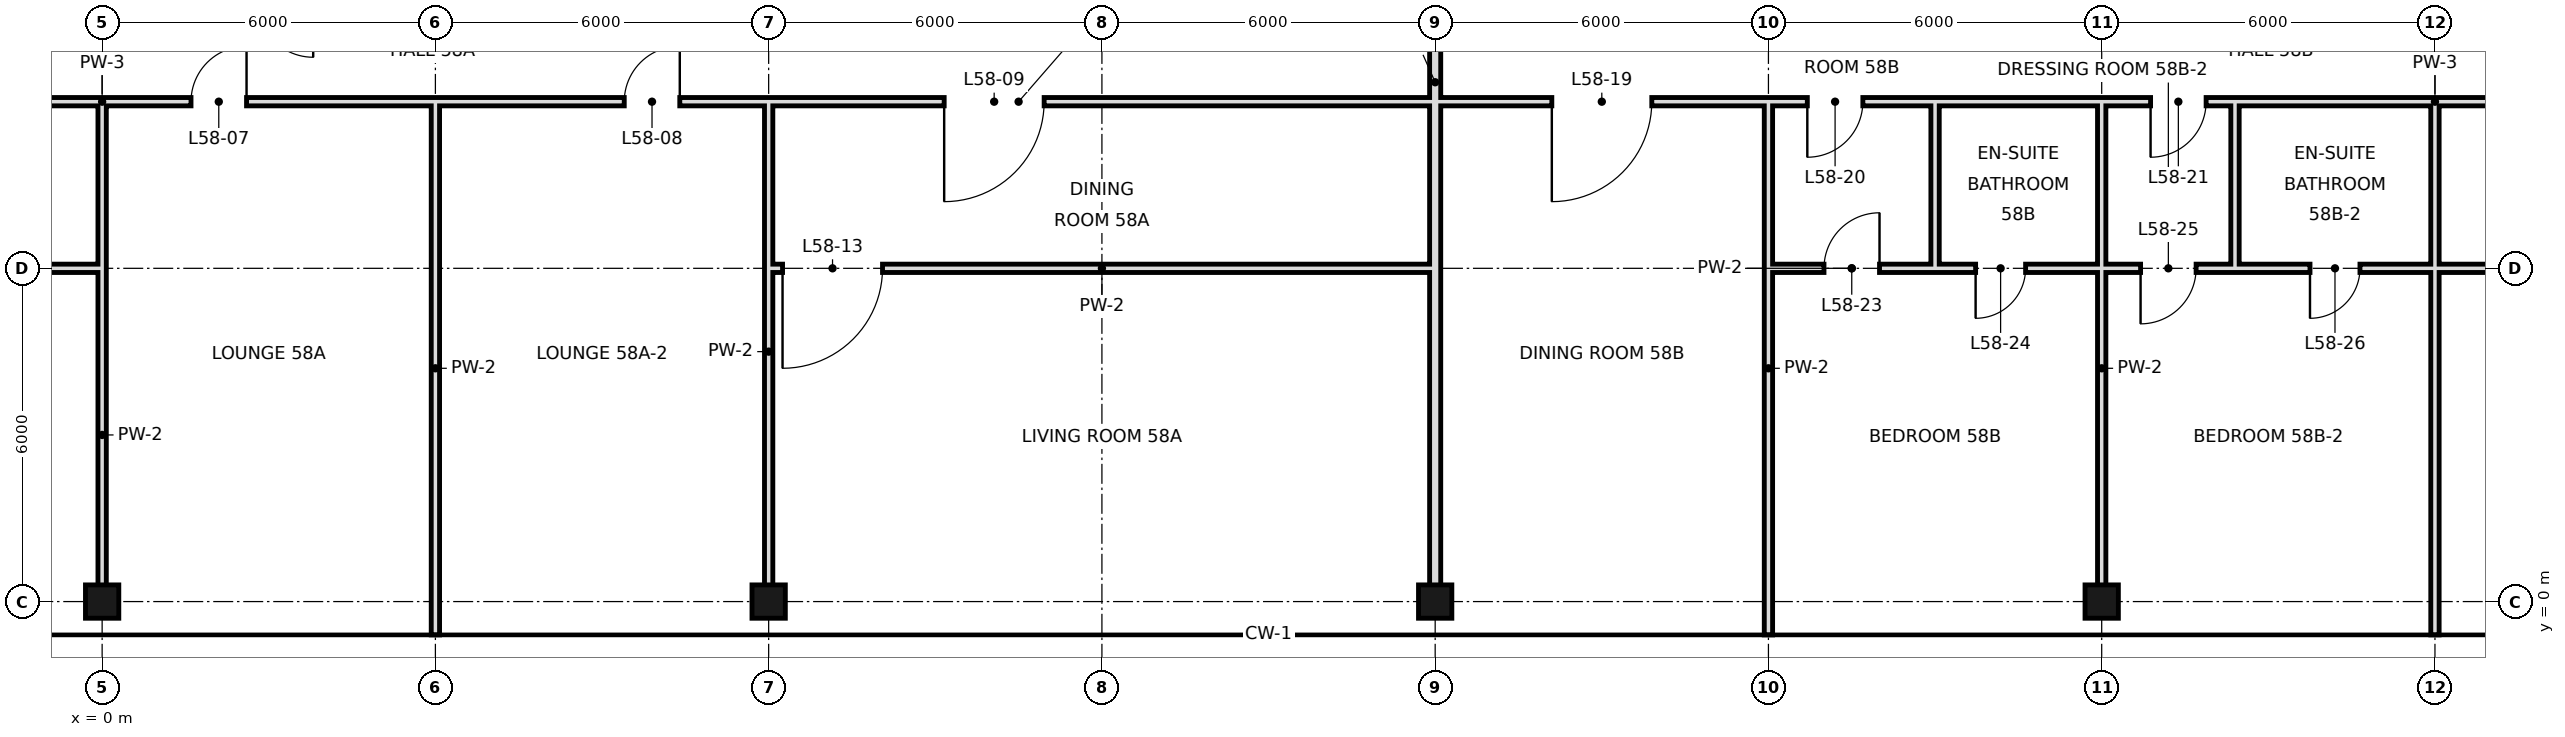
"""IFC4 building model, lengths in metres.
Left out: names, types, materials, properties, quantities, classifications, styles, units other than length and angle.
Written with IfcOpenShell. Run it as: python <this file> out.ifc"""

import sys

from ifc_helpers import new_model, si_unit, direction, frame, frame_2d, origin, origin_2d, place, context, subcontext, project, spatial, rectangle, hollow_rectangle, extrude, element, fill, save


model = new_model("IFC4")
c1 = context("Model", 3, precision=1e-05, world=origin(), true_north=direction((0.0, 1.0)))
c2 = subcontext(c1, "Body", "Model", "MODEL_VIEW")
j1 = project(units=[si_unit("LENGTHUNIT", "METRE"), si_unit("PLANEANGLEUNIT", "RADIAN")], contexts=[c1])
p1 = place(None, origin())
s1 = spatial("IfcSite", under=j1, at=p1, CompositionType="ELEMENT")
p2 = place(p1, origin())
s2 = spatial("IfcBuilding", under=s1, at=p2, CompositionType="ELEMENT")
p3 = place(p2, frame((0.0, 0.0, 246.8)))
s3 = spatial("IfcBuildingStorey", under=s2, at=p3, CompositionType="ELEMENT", Elevation=246.8)
for number, where, z_axis, x_axis in (
    (1, (0.0, 0.0, 0.0), (0.0, 0.0, 1.0), (1.0, 0.0, 0.0)),
    (2, (12.0, 0.0, 0.0), (0.0, 0.0, 1.0), (1.0, 0.0, 0.0)),
    (3, (24.0, 0.0, 0.0), (0.0, 0.0, 1.0), (1.0, 0.0, 0.0)),
    (4, (36.0, 0.0, 0.0), (0.0, 0.0, 1.0), (1.0, 0.0, 0.0)),
):
    element("IfcColumn", number, at=place(p3, frame(where, z_axis=z_axis, x_axis=x_axis)), inside=s3, PredefinedType="COLUMN", context=c2, shape_type="SweptSolid", body=[
        extrude(hollow_rectangle(XDim=0.6, YDim=0.6, WallThickness=0.028, at=origin_2d()), origin(), (0.0, 0.0, 1.0), 3.6),
    ])
p4 = place(p3, frame((0.0, 0.0, 0.0), z_axis=(0.0, 0.0, 1.0), x_axis=(0.0, 1.0, 0.0)))
e5 = element("IfcWall", 5, at=p4, inside=s3, PredefinedType="PARTITIONING", context=c2, shape_type="SweptSolid", body=[
    extrude(rectangle(XDim=6.0, YDim=0.15, at=frame_2d((3.0, 0.0))), origin(), (0.0, 0.0, 1.0), 2.72),
])
p5 = place(p3, frame((0.0, 6.0, 0.0), z_axis=(0.0, 0.0, 1.0), x_axis=(0.0, 1.0, 0.0)))
e6 = element("IfcWall", 6, at=p5, inside=s3, PredefinedType="PARTITIONING", context=c2, shape_type="SweptSolid", body=[
    extrude(rectangle(XDim=3.0, YDim=0.15, at=frame_2d((1.5, 0.0))), origin(), (0.0, 0.0, 1.0), 2.72),
])
p6 = place(p3, frame((12.0, 0.0, 0.0), z_axis=(0.0, 0.0, 1.0), x_axis=(0.0, 1.0, 0.0)))
e7 = element("IfcWall", 7, at=p6, inside=s3, PredefinedType="PARTITIONING", context=c2, shape_type="SweptSolid", body=[
    extrude(rectangle(XDim=9.0, YDim=0.15, at=frame_2d((4.5, 0.0))), origin(), (0.0, 0.0, 1.0), 2.72),
])
p7 = place(p3, frame((24.0, 0.0, 0.0), z_axis=(0.0, 0.0, 1.0), x_axis=(0.0, 1.0, 0.0)))
e8 = element("IfcWall", 8, at=p7, inside=s3, PredefinedType="SOLIDWALL", context=c2, shape_type="SweptSolid", body=[
    extrude(rectangle(XDim=18.7, YDim=0.2, at=frame_2d((9.35, 0.0))), origin(), (0.0, 0.0, 1.0), 2.72),
])
p8 = place(p3, frame((30.0, -0.6, 0.0), z_axis=(0.0, 0.0, 1.0), x_axis=(0.0, 1.0, 0.0)))
e9 = element("IfcWall", 9, at=p8, inside=s3, PredefinedType="PARTITIONING", context=c2, shape_type="SweptSolid", body=[
    extrude(rectangle(XDim=9.6, YDim=0.15, at=frame_2d((4.8, 0.0))), origin(), (0.0, 0.0, 1.0), 2.72),
])
p9 = place(p3, frame((33.0, 6.0, 0.0), z_axis=(0.0, 0.0, 1.0), x_axis=(0.0, 1.0, 0.0)))
e10 = element("IfcWall", 10, at=p9, inside=s3, PredefinedType="PARTITIONING", context=c2, shape_type="SweptSolid", body=[
    extrude(rectangle(XDim=3.0, YDim=0.15, at=frame_2d((1.5, 0.0))), origin(), (0.0, 0.0, 1.0), 3.42),
])
p10 = place(p3, frame((36.0, 0.0, 0.0), z_axis=(0.0, 0.0, 1.0), x_axis=(0.0, 1.0, 0.0)))
e11 = element("IfcWall", 11, at=p10, inside=s3, PredefinedType="PARTITIONING", context=c2, shape_type="SweptSolid", body=[
    extrude(rectangle(XDim=6.0, YDim=0.15, at=frame_2d((3.0, 0.0))), origin(), (0.0, 0.0, 1.0), 2.72),
])
p11 = place(p3, frame((36.0, 6.0, 0.0), z_axis=(0.0, 0.0, 1.0), x_axis=(0.0, 1.0, 0.0)))
e12 = element("IfcWall", 12, at=p11, inside=s3, PredefinedType="PARTITIONING", context=c2, shape_type="SweptSolid", body=[
    extrude(rectangle(XDim=3.0, YDim=0.15, at=frame_2d((1.5, 0.0))), origin(), (0.0, 0.0, 1.0), 2.72),
])
p12 = place(p3, frame((38.4, 6.0, 0.0), z_axis=(0.0, 0.0, 1.0), x_axis=(0.0, 1.0, 0.0)))
e13 = element("IfcWall", 13, at=p12, inside=s3, PredefinedType="PARTITIONING", context=c2, shape_type="SweptSolid", body=[
    extrude(rectangle(XDim=3.0, YDim=0.15, at=frame_2d((1.5, 0.0))), origin(), (0.0, 0.0, 1.0), 3.42),
])
p13 = place(p3, frame((42.0, -0.6, 0.0), z_axis=(0.0, 0.0, 1.0), x_axis=(0.0, 1.0, 0.0)))
e14 = element("IfcWall", 14, at=p13, inside=s3, PredefinedType="PARTITIONING", context=c2, shape_type="SweptSolid", body=[
    extrude(rectangle(XDim=6.6, YDim=0.15, at=frame_2d((3.3, 0.0))), origin(), (0.0, 0.0, 1.0), 2.72),
])
p14 = place(p3, frame((42.0, 6.0, 0.0), z_axis=(0.0, 0.0, 1.0), x_axis=(0.0, 1.0, 0.0)))
e15 = element("IfcWall", 15, at=p14, inside=s3, PredefinedType="PARTITIONING", context=c2, shape_type="SweptSolid", body=[
    extrude(rectangle(XDim=3.0, YDim=0.15, at=frame_2d((1.5, 0.0))), origin(), (0.0, 0.0, 1.0), 2.72),
])
p15 = place(p3, frame((6.0, -0.6, 0.0), z_axis=(0.0, 0.0, 1.0), x_axis=(0.0, 1.0, 0.0)))
e16 = element("IfcWall", 16, at=p15, inside=s3, PredefinedType="PARTITIONING", context=c2, shape_type="SweptSolid", body=[
    extrude(rectangle(XDim=9.6, YDim=0.15, at=frame_2d((4.8, 0.0))), origin(), (0.0, 0.0, 1.0), 2.72),
])
p16 = place(p3, frame((12.0, 6.0, 0.0), z_axis=(0.0, 0.0, 1.0), x_axis=(1.0, 0.0, 0.0)))
e17 = element("IfcWall", 17, at=p16, inside=s3, PredefinedType="PARTITIONING", context=c2, shape_type="SweptSolid", body=[
    extrude(rectangle(XDim=12.0, YDim=0.15, at=frame_2d((6.0, 0.0))), origin(), (0.0, 0.0, 1.0), 2.97),
])
p17 = place(p16, frame((0.25, 0.0, 0.0)))
e18 = element("IfcOpeningElement", 18, at=p17, cuts=e17, PredefinedType="OPENING", context=c2, shape_type="SweptSolid", body=[
    extrude(rectangle(XDim=1.8, YDim=2.4, at=frame_2d((0.9, 1.2))), frame((0.0, 0.085, 0.0), z_axis=(0.0, -1.0, 0.0), x_axis=(1.0, 0.0, 0.0)), (0.0, 0.0, 1.0), 0.17),
])
p18 = place(p3, frame((30.0, 6.0, 0.0), z_axis=(0.0, 0.0, 1.0), x_axis=(1.0, 0.0, 0.0)))
e19 = element("IfcWall", 19, at=p18, inside=s3, PredefinedType="PARTITIONING", context=c2, shape_type="SweptSolid", body=[
    extrude(rectangle(XDim=3.0, YDim=0.15, at=frame_2d((1.5, 0.0))), origin(), (0.0, 0.0, 1.0), 2.97),
])
p19 = place(p18, frame((1.0, 0.0, 0.0)))
e20 = element("IfcOpeningElement", 20, at=p19, cuts=e19, PredefinedType="OPENING", context=c2, shape_type="SweptSolid", body=[
    extrude(rectangle(XDim=1.0, YDim=2.4, at=frame_2d((0.5, 1.2))), frame((0.0, 0.085, 0.0), z_axis=(0.0, -1.0, 0.0), x_axis=(1.0, 0.0, 0.0)), (0.0, 0.0, 1.0), 0.17),
])
p20 = place(p3, frame((36.0, 6.0, 0.0), z_axis=(0.0, 0.0, 1.0), x_axis=(1.0, 0.0, 0.0)))
e21 = element("IfcWall", 21, at=p20, inside=s3, PredefinedType="PARTITIONING", context=c2, shape_type="SweptSolid", body=[
    extrude(rectangle(XDim=2.4, YDim=0.15, at=frame_2d((1.2, 0.0))), origin(), (0.0, 0.0, 1.0), 2.97),
])
p21 = place(p20, frame((0.7, 0.0, 0.0)))
e22 = element("IfcOpeningElement", 22, at=p21, cuts=e21, PredefinedType="OPENING", context=c2, shape_type="SweptSolid", body=[
    extrude(rectangle(XDim=1.0, YDim=2.4, at=frame_2d((0.5, 1.2))), frame((0.0, 0.085, 0.0), z_axis=(0.0, -1.0, 0.0), x_axis=(1.0, 0.0, 0.0)), (0.0, 0.0, 1.0), 0.17),
])
p22 = place(p3, frame((42.0, 6.0, 0.0), z_axis=(0.0, 0.0, 1.0), x_axis=(1.0, 0.0, 0.0)))
e23 = element("IfcWall", 23, at=p22, inside=s3, PredefinedType="PARTITIONING", context=c2, shape_type="SweptSolid", body=[
    extrude(rectangle(XDim=12.0, YDim=0.15, at=frame_2d((6.0, 0.0))), origin(), (0.0, 0.0, 1.0), 2.97),
])
p23 = place(p22, frame((7.04, 0.0, 0.0)))
e24 = element("IfcOpeningElement", 24, at=p23, cuts=e23, PredefinedType="OPENING", context=c2, shape_type="SweptSolid", body=[
    extrude(rectangle(XDim=1.8, YDim=2.4, at=frame_2d((0.9, 1.2))), frame((0.0, 0.085, 0.0), z_axis=(0.0, -1.0, 0.0), x_axis=(1.0, 0.0, 0.0)), (0.0, 0.0, 1.0), 0.17),
])
p24 = place(p3, frame((-8.4, 6.0, 0.0), z_axis=(0.0, 0.0, 1.0), x_axis=(1.0, 0.0, 0.0)))
e25 = element("IfcWall", 25, at=p24, inside=s3, PredefinedType="PARTITIONING", context=c2, shape_type="SweptSolid", body=[
    extrude(rectangle(XDim=8.4, YDim=0.15, at=frame_2d((4.2, 0.0))), origin(), (0.0, 0.0, 1.0), 2.72),
])
p25 = place(p24, frame((1.25, 0.0, 0.0)))
e26 = element("IfcOpeningElement", 26, at=p25, cuts=e25, PredefinedType="OPENING", context=c2, shape_type="SweptSolid", body=[
    extrude(rectangle(XDim=0.9, YDim=2.4, at=frame_2d((0.45, 1.2))), frame((0.0, 0.085, 0.0), z_axis=(0.0, -1.0, 0.0), x_axis=(1.0, 0.0, 0.0)), (0.0, 0.0, 1.0), 0.17),
])
p26 = place(p3, frame((33.0, 6.0, 0.0), z_axis=(0.0, 0.0, 1.0), x_axis=(1.0, 0.0, 0.0)))
e27 = element("IfcWall", 27, at=p26, inside=s3, PredefinedType="PARTITIONING", context=c2, shape_type="SweptSolid", body=[
    extrude(rectangle(XDim=3.0, YDim=0.15, at=frame_2d((1.5, 0.0))), origin(), (0.0, 0.0, 1.0), 2.97),
])
p27 = place(p26, frame((0.73, 0.0, 0.0)))
e28 = element("IfcOpeningElement", 28, at=p27, cuts=e27, PredefinedType="OPENING", context=c2, shape_type="SweptSolid", body=[
    extrude(rectangle(XDim=0.9, YDim=2.4, at=frame_2d((0.45, 1.2))), frame((0.0, 0.085, 0.0), z_axis=(0.0, -1.0, 0.0), x_axis=(1.0, 0.0, 0.0)), (0.0, 0.0, 1.0), 0.17),
])
p28 = place(p3, frame((38.4, 6.0, 0.0), z_axis=(0.0, 0.0, 1.0), x_axis=(1.0, 0.0, 0.0)))
e29 = element("IfcWall", 29, at=p28, inside=s3, PredefinedType="PARTITIONING", context=c2, shape_type="SweptSolid", body=[
    extrude(rectangle(XDim=3.6, YDim=0.15, at=frame_2d((1.8, 0.0))), origin(), (0.0, 0.0, 1.0), 2.97),
])
p29 = place(p28, frame((1.35, 0.0, 0.0)))
e30 = element("IfcOpeningElement", 30, at=p29, cuts=e29, PredefinedType="OPENING", context=c2, shape_type="SweptSolid", body=[
    extrude(rectangle(XDim=0.9, YDim=2.4, at=frame_2d((0.45, 1.2))), frame((0.0, 0.085, 0.0), z_axis=(0.0, -1.0, 0.0), x_axis=(1.0, 0.0, 0.0)), (0.0, 0.0, 1.0), 0.17),
])
p30 = place(p3, frame((0.0, 9.0, 0.0), z_axis=(0.0, 0.0, 1.0), x_axis=(1.0, 0.0, 0.0)))
e31 = element("IfcWall", 31, at=p30, inside=s3, PredefinedType="PARTITIONING", context=c2, shape_type="SweptSolid", body=[
    extrude(rectangle(XDim=33.0, YDim=0.15, at=frame_2d((16.5, 0.0))), origin(), (0.0, 0.0, 1.0), 3.42),
])
p31 = place(p30, frame((1.6, 0.0, 0.0)))
e32 = element("IfcOpeningElement", 32, at=p31, cuts=e31, PredefinedType="OPENING", context=c2, shape_type="SweptSolid", body=[
    extrude(rectangle(XDim=1.0, YDim=2.4, at=frame_2d((0.5, 1.2))), frame((0.0, 0.085, 0.0), z_axis=(0.0, -1.0, 0.0), x_axis=(1.0, 0.0, 0.0)), (0.0, 0.0, 1.0), 0.17),
])
p32 = place(p30, frame((9.4, 0.0, 0.0)))
e33 = element("IfcOpeningElement", 33, at=p32, cuts=e31, PredefinedType="OPENING", context=c2, shape_type="SweptSolid", body=[
    extrude(rectangle(XDim=1.0, YDim=2.4, at=frame_2d((0.5, 1.2))), frame((0.0, 0.085, 0.0), z_axis=(0.0, -1.0, 0.0), x_axis=(1.0, 0.0, 0.0)), (0.0, 0.0, 1.0), 0.17),
])
p33 = place(p30, frame((15.16, 0.0, 0.0)))
e34 = element("IfcOpeningElement", 34, at=p33, cuts=e31, PredefinedType="OPENING", context=c2, shape_type="SweptSolid", body=[
    extrude(rectangle(XDim=1.8, YDim=2.4, at=frame_2d((0.9, 1.2))), frame((0.0, 0.085, 0.0), z_axis=(0.0, -1.0, 0.0), x_axis=(1.0, 0.0, 0.0)), (0.0, 0.0, 1.0), 0.17),
])
p34 = place(p30, frame((26.1, 0.0, 0.0)))
e35 = element("IfcOpeningElement", 35, at=p34, cuts=e31, PredefinedType="OPENING", context=c2, shape_type="SweptSolid", body=[
    extrude(rectangle(XDim=1.8, YDim=2.4, at=frame_2d((0.9, 1.2))), frame((0.0, 0.085, 0.0), z_axis=(0.0, -1.0, 0.0), x_axis=(1.0, 0.0, 0.0)), (0.0, 0.0, 1.0), 0.17),
])
p35 = place(p30, frame((30.7, 0.0, 0.0)))
e36 = element("IfcOpeningElement", 36, at=p35, cuts=e31, PredefinedType="OPENING", context=c2, shape_type="SweptSolid", body=[
    extrude(rectangle(XDim=1.0, YDim=2.4, at=frame_2d((0.5, 1.2))), frame((0.0, 0.085, 0.0), z_axis=(0.0, -1.0, 0.0), x_axis=(1.0, 0.0, 0.0)), (0.0, 0.0, 1.0), 0.17),
])
p36 = place(p3, frame((36.0, 9.0, 0.0), z_axis=(0.0, 0.0, 1.0), x_axis=(1.0, 0.0, 0.0)))
e37 = element("IfcWall", 37, at=p36, inside=s3, PredefinedType="PARTITIONING", context=c2, shape_type="SweptSolid", body=[
    extrude(rectangle(XDim=2.4, YDim=0.15, at=frame_2d((1.2, 0.0))), origin(), (0.0, 0.0, 1.0), 3.42),
])
p37 = place(p36, frame((0.88, 0.0, 0.0)))
e38 = element("IfcOpeningElement", 38, at=p37, cuts=e37, PredefinedType="OPENING", context=c2, shape_type="SweptSolid", body=[
    extrude(rectangle(XDim=1.0, YDim=2.4, at=frame_2d((0.5, 1.2))), frame((0.0, 0.085, 0.0), z_axis=(0.0, -1.0, 0.0), x_axis=(1.0, 0.0, 0.0)), (0.0, 0.0, 1.0), 0.17),
])
p38 = place(p3, frame((42.0, 9.0, 0.0), z_axis=(0.0, 0.0, 1.0), x_axis=(1.0, 0.0, 0.0)))
e39 = element("IfcWall", 39, at=p38, inside=s3, PredefinedType="PARTITIONING", context=c2, shape_type="SweptSolid", body=[
    extrude(rectangle(XDim=12.6, YDim=0.15, at=frame_2d((6.3, 0.0))), origin(), (0.0, 0.0, 1.0), 3.42),
])
p39 = place(p38, frame((7.04, 0.0, 0.0)))
e40 = element("IfcOpeningElement", 40, at=p39, cuts=e39, PredefinedType="OPENING", context=c2, shape_type="SweptSolid", body=[
    extrude(rectangle(XDim=1.8, YDim=2.4, at=frame_2d((0.9, 1.2))), frame((0.0, 0.085, 0.0), z_axis=(0.0, -1.0, 0.0), x_axis=(1.0, 0.0, 0.0)), (0.0, 0.0, 1.0), 0.17),
])
p40 = place(p3, frame((-8.4, 9.0, 0.0), z_axis=(0.0, 0.0, 1.0), x_axis=(1.0, 0.0, 0.0)))
e41 = element("IfcWall", 41, at=p40, inside=s3, PredefinedType="PARTITIONING", context=c2, shape_type="SweptSolid", body=[
    extrude(rectangle(XDim=8.4, YDim=0.15, at=frame_2d((4.2, 0.0))), origin(), (0.0, 0.0, 1.0), 3.42),
])
p41 = place(p3, frame((33.0, 9.0, 0.0), z_axis=(0.0, 0.0, 1.0), x_axis=(1.0, 0.0, 0.0)))
e42 = element("IfcWall", 42, at=p41, inside=s3, PredefinedType="PARTITIONING", context=c2, shape_type="SweptSolid", body=[
    extrude(rectangle(XDim=3.0, YDim=0.15, at=frame_2d((1.5, 0.0))), origin(), (0.0, 0.0, 1.0), 3.42),
])
p42 = place(p3, frame((38.4, 9.0, 0.0), z_axis=(0.0, 0.0, 1.0), x_axis=(1.0, 0.0, 0.0)))
e43 = element("IfcWall", 43, at=p42, inside=s3, PredefinedType="PARTITIONING", context=c2, shape_type="SweptSolid", body=[
    extrude(rectangle(XDim=3.6, YDim=0.15, at=frame_2d((1.8, 0.0))), origin(), (0.0, 0.0, 1.0), 3.42),
])
p43 = place(p31, frame((1.0, 0.0, 0.0), z_axis=(0.0, 0.0, 1.0), x_axis=(-1.0, 0.0, 0.0)))
e44 = element("IfcDoor", 44, at=p43, inside=s3, OperationType="SINGLE_SWING_LEFT", PredefinedType="DOOR", context=c2, shape_type="SweptSolid", body=[
    extrude(rectangle(XDim=1.0, YDim=2.4, at=frame_2d((0.5, 1.2))), frame((0.0, 0.025, 0.0), z_axis=(0.0, -1.0, 0.0), x_axis=(1.0, 0.0, 0.0)), (0.0, 0.0, 1.0), 0.05),
])
fill(e32, e44)
p44 = place(p32, frame((1.0, 0.0, 0.0), z_axis=(0.0, 0.0, 1.0), x_axis=(-1.0, 0.0, 0.0)))
e45 = element("IfcDoor", 45, at=p44, inside=s3, OperationType="SINGLE_SWING_LEFT", PredefinedType="DOOR", context=c2, shape_type="SweptSolid", body=[
    extrude(rectangle(XDim=1.0, YDim=2.4, at=frame_2d((0.5, 1.2))), frame((0.0, 0.025, 0.0), z_axis=(0.0, -1.0, 0.0), x_axis=(1.0, 0.0, 0.0)), (0.0, 0.0, 1.0), 0.05),
])
fill(e33, e45)
p45 = place(p33, frame((1.8, 0.0, 0.0), z_axis=(0.0, 0.0, 1.0), x_axis=(-1.0, 0.0, 0.0)))
e46 = element("IfcDoor", 46, at=p45, inside=s3, OperationType="SINGLE_SWING_RIGHT", PredefinedType="DOOR", context=c2, shape_type="SweptSolid", body=[
    extrude(rectangle(XDim=1.8, YDim=2.4, at=frame_2d((0.9, 1.2))), frame((0.0, 0.025, 0.0), z_axis=(0.0, -1.0, 0.0), x_axis=(1.0, 0.0, 0.0)), (0.0, 0.0, 1.0), 0.05),
])
fill(e34, e46)
p46 = place(p17, frame((1.8, 0.0, 0.0), z_axis=(0.0, 0.0, 1.0), x_axis=(-1.0, 0.0, 0.0)))
e47 = element("IfcDoor", 47, at=p46, inside=s3, OperationType="SINGLE_SWING_RIGHT", PredefinedType="DOOR", context=c2, shape_type="SweptSolid", body=[
    extrude(rectangle(XDim=1.8, YDim=2.4, at=frame_2d((0.9, 1.2))), frame((0.0, 0.025, 0.0), z_axis=(0.0, -1.0, 0.0), x_axis=(1.0, 0.0, 0.0)), (0.0, 0.0, 1.0), 0.05),
])
fill(e18, e47)
p47 = place(p34, frame((1.8, 0.0, 0.0), z_axis=(0.0, 0.0, 1.0), x_axis=(-1.0, 0.0, 0.0)))
e48 = element("IfcDoor", 48, at=p47, inside=s3, OperationType="SINGLE_SWING_RIGHT", PredefinedType="DOOR", context=c2, shape_type="SweptSolid", body=[
    extrude(rectangle(XDim=1.8, YDim=2.4, at=frame_2d((0.9, 1.2))), frame((0.0, 0.025, 0.0), z_axis=(0.0, -1.0, 0.0), x_axis=(1.0, 0.0, 0.0)), (0.0, 0.0, 1.0), 0.05),
])
fill(e35, e48)
p48 = place(p35, frame((1.0, 0.0, 0.0), z_axis=(0.0, 0.0, 1.0), x_axis=(-1.0, 0.0, 0.0)))
e49 = element("IfcDoor", 49, at=p48, inside=s3, OperationType="SINGLE_SWING_RIGHT", PredefinedType="DOOR", context=c2, shape_type="SweptSolid", body=[
    extrude(rectangle(XDim=1.0, YDim=2.4, at=frame_2d((0.5, 1.2))), frame((0.0, 0.025, 0.0), z_axis=(0.0, -1.0, 0.0), x_axis=(1.0, 0.0, 0.0)), (0.0, 0.0, 1.0), 0.05),
])
fill(e36, e49)
p49 = place(p37, frame((1.0, 0.0, 0.0), z_axis=(0.0, 0.0, 1.0), x_axis=(-1.0, 0.0, 0.0)))
e50 = element("IfcDoor", 50, at=p49, inside=s3, OperationType="SINGLE_SWING_RIGHT", PredefinedType="DOOR", context=c2, shape_type="SweptSolid", body=[
    extrude(rectangle(XDim=1.0, YDim=2.4, at=frame_2d((0.5, 1.2))), frame((0.0, 0.025, 0.0), z_axis=(0.0, -1.0, 0.0), x_axis=(1.0, 0.0, 0.0)), (0.0, 0.0, 1.0), 0.05),
])
fill(e38, e50)
p50 = place(p19, frame((1.0, 0.0, 0.0), z_axis=(0.0, 0.0, 1.0), x_axis=(-1.0, 0.0, 0.0)))
e51 = element("IfcDoor", 51, at=p50, inside=s3, OperationType="SINGLE_SWING_LEFT", PredefinedType="DOOR", context=c2, shape_type="SweptSolid", body=[
    extrude(rectangle(XDim=1.0, YDim=2.4, at=frame_2d((0.5, 1.2))), frame((0.0, 0.025, 0.0), z_axis=(0.0, -1.0, 0.0), x_axis=(1.0, 0.0, 0.0)), (0.0, 0.0, 1.0), 0.05),
])
fill(e20, e51)
p51 = place(p27, frame((0.9, 0.0, 0.0), z_axis=(0.0, 0.0, 1.0), x_axis=(-1.0, 0.0, 0.0)))
e52 = element("IfcDoor", 52, at=p51, inside=s3, OperationType="SINGLE_SWING_RIGHT", PredefinedType="DOOR", context=c2, shape_type="SweptSolid", body=[
    extrude(rectangle(XDim=0.9, YDim=2.4, at=frame_2d((0.45, 1.2))), frame((0.0, 0.025, 0.0), z_axis=(0.0, -1.0, 0.0), x_axis=(1.0, 0.0, 0.0)), (0.0, 0.0, 1.0), 0.05),
])
fill(e28, e52)
p52 = place(p21, frame((1.0, 0.0, 0.0), z_axis=(0.0, 0.0, 1.0), x_axis=(-1.0, 0.0, 0.0)))
e53 = element("IfcDoor", 53, at=p52, inside=s3, OperationType="SINGLE_SWING_RIGHT", PredefinedType="DOOR", context=c2, shape_type="SweptSolid", body=[
    extrude(rectangle(XDim=1.0, YDim=2.4, at=frame_2d((0.5, 1.2))), frame((0.0, 0.025, 0.0), z_axis=(0.0, -1.0, 0.0), x_axis=(1.0, 0.0, 0.0)), (0.0, 0.0, 1.0), 0.05),
])
fill(e22, e53)
p53 = place(p29, frame((0.9, 0.0, 0.0), z_axis=(0.0, 0.0, 1.0), x_axis=(-1.0, 0.0, 0.0)))
e54 = element("IfcDoor", 54, at=p53, inside=s3, OperationType="SINGLE_SWING_RIGHT", PredefinedType="DOOR", context=c2, shape_type="SweptSolid", body=[
    extrude(rectangle(XDim=0.9, YDim=2.4, at=frame_2d((0.45, 1.2))), frame((0.0, 0.025, 0.0), z_axis=(0.0, -1.0, 0.0), x_axis=(1.0, 0.0, 0.0)), (0.0, 0.0, 1.0), 0.05),
])
fill(e30, e54)
save(model, sys.argv[1])
